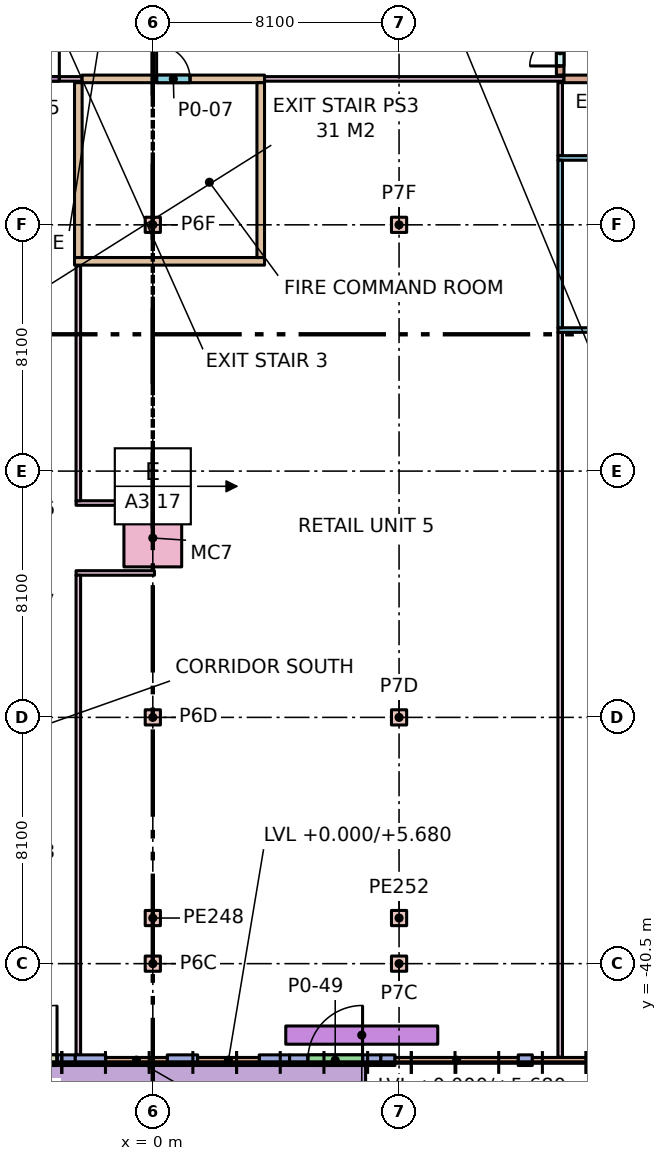
"""IFC4 building model, lengths in metres.
Left out: names, types, materials, properties, quantities, classifications, styles, units other than length and angle.
Written with IfcOpenShell. Run it as: python <this file> out.ifc"""

import sys

from ifc_helpers import new_model, si_unit, direction, frame, frame_2d, origin, origin_2d, place, context, subcontext, project, spatial, rectangle, extrude, element, fill, save


model = new_model("IFC4")
c1 = context("Model", 3, precision=1e-05, world=origin(), true_north=direction((0.0, 1.0)))
c2 = subcontext(c1, "Body", "Model", "MODEL_VIEW")
j1 = project(units=[si_unit("LENGTHUNIT", "METRE"), si_unit("PLANEANGLEUNIT", "RADIAN")], contexts=[c1])
p1 = place(None, origin())
s1 = spatial("IfcSite", under=j1, at=p1, CompositionType="ELEMENT")
p2 = place(p1, origin())
s2 = spatial("IfcBuilding", under=s1, at=p2, CompositionType="ELEMENT")
p3 = place(p2, origin())
s3 = spatial("IfcBuildingStorey", under=s2, at=p3, CompositionType="ELEMENT", Elevation=0.0)
for number, where, z_axis, x_axis in (
    (1, (0.0, -40.5, 0.0), (0.0, 0.0, 1.0), (1.0, 0.0, 0.0)),
    (2, (0.0, -32.4, 0.0), (0.0, 0.0, 1.0), (1.0, 0.0, 0.0)),
    (3, (0.0, -16.2, 0.0), (0.0, 0.0, 1.0), (1.0, 0.0, 0.0)),
    (4, (8.1, -40.5, 0.0), (0.0, 0.0, 1.0), (1.0, 0.0, 0.0)),
    (5, (8.1, -32.4, 0.0), (0.0, 0.0, 1.0), (1.0, 0.0, 0.0)),
    (6, (8.1, -16.2, 0.0), (0.0, 0.0, 1.0), (1.0, 0.0, 0.0)),
    (7, (0.0, -39.0, 0.0), (0.0, 0.0, 1.0), (1.0, 0.0, 0.0)),
    (8, (8.1, -39.0, 0.0), (0.0, 0.0, 1.0), (1.0, 0.0, 0.0)),
):
    element("IfcColumn", number, at=place(p3, frame(where, z_axis=z_axis, x_axis=x_axis)), inside=s3, PredefinedType="COLUMN", context=c2, shape_type="SweptSolid", body=[
        extrude(rectangle(XDim=0.5, YDim=0.5, at=origin_2d()), origin(), (0.0, 0.0, 1.0), 6.0),
    ])
p4 = place(p3, frame((0.0, -26.5, 0.0), z_axis=(0.0, 0.0, 1.0), x_axis=(1.0, 0.0, 0.0)))
e9 = element("IfcColumn", 9, at=p4, inside=s3, PredefinedType="COLUMN", context=c2, shape_type="SweptSolid", body=[
    extrude(rectangle(XDim=1.9, YDim=1.9, at=origin_2d()), origin(), (0.0, 0.0, 1.0), 6.0),
])
p5 = place(p3, frame((-5.55, -43.675, 0.0), z_axis=(0.0, 0.0, 1.0), x_axis=(1.0, 0.0, 0.0)))
e10 = element("IfcWall", 10, at=p5, inside=s3, PredefinedType="STANDARD", context=c2, shape_type="SweptSolid", body=[
    extrude(rectangle(XDim=3.0, YDim=0.35, at=frame_2d((1.5, 0.0))), origin(), (0.0, 0.0, 1.0), 5.68),
])
p6 = place(p5, frame((0.6, 0.0, 0.0)))
e11 = element("IfcOpeningElement", 11, at=p6, cuts=e10, PredefinedType="OPENING", context=c2, shape_type="SweptSolid", body=[
    extrude(rectangle(XDim=1.8, YDim=2.4, at=frame_2d((0.9, 1.2))), frame((0.0, 0.185, 0.0), z_axis=(0.0, -1.0, 0.0), x_axis=(1.0, 0.0, 0.0)), (0.0, 0.0, 1.0), 0.37),
])
for number, where, z_axis, x_axis in (
    (12, (-2.55, -43.675, 0.0), (0.0, 0.0, 1.0), (1.0, 0.0, 0.0)),
    (13, (0.475, -43.675, 0.0), (0.0, 0.0, 1.0), (1.0, 0.0, 0.0)),
    (14, (3.5, -43.675, 0.0), (0.0, 0.0, 1.0), (1.0, 0.0, 0.0)),
):
    element("IfcWall", number, at=place(p3, frame(where, z_axis=z_axis, x_axis=x_axis)), inside=s3, PredefinedType="STANDARD", context=c2, shape_type="SweptSolid", body=[
        extrude(rectangle(XDim=1.0, YDim=0.35, at=frame_2d((0.5, 0.0))), origin(), (0.0, 0.0, 1.0), 5.68),
    ])
p7 = place(p3, frame((4.5, -43.675, 0.0), z_axis=(0.0, 0.0, 1.0), x_axis=(1.0, 0.0, 0.0)))
e15 = element("IfcWall", 15, at=p7, inside=s3, PredefinedType="STANDARD", context=c2, shape_type="SweptSolid", body=[
    extrude(rectangle(XDim=3.0, YDim=0.35, at=frame_2d((1.5, 0.0))), origin(), (0.0, 0.0, 1.0), 5.68),
])
p8 = place(p7, frame((0.6, 0.0, 0.0)))
e16 = element("IfcOpeningElement", 16, at=p8, cuts=e15, PredefinedType="OPENING", context=c2, shape_type="SweptSolid", body=[
    extrude(rectangle(XDim=1.8, YDim=2.7, at=frame_2d((0.9, 1.35))), frame((0.0, 0.185, 0.0), z_axis=(0.0, -1.0, 0.0), x_axis=(1.0, 0.0, 0.0)), (0.0, 0.0, 1.0), 0.37),
])
for number, where, z_axis, x_axis in (
    (17, (7.5, -43.675, 0.0), (0.0, 0.0, 1.0), (1.0, 0.0, 0.0)),
    (18, (12.017, -43.675, 0.0), (0.0, 0.0, 1.0), (1.0, 0.0, 0.0)),
):
    element("IfcWall", number, at=place(p3, frame(where, z_axis=z_axis, x_axis=x_axis)), inside=s3, PredefinedType="STANDARD", context=c2, shape_type="SweptSolid", body=[
        extrude(rectangle(XDim=0.467, YDim=0.35, at=frame_2d((0.233, 0.0))), origin(), (0.0, 0.0, 1.0), 5.68),
    ])
p9 = place(p3, frame((4.373, -42.85, 6.0), z_axis=(0.0, 0.0, 1.0), x_axis=(1.0, 0.0, 0.0)))
e19 = element("IfcWall", 19, at=p9, inside=s3, PredefinedType="PARAPET", context=c2, shape_type="SweptSolid", body=[
    extrude(rectangle(XDim=5.0, YDim=0.6, at=frame_2d((2.5, 0.0))), origin(), (0.0, 0.0, 1.0), 0.9),
])
p10 = place(p3, frame((-2.325, -11.4, 0.0), z_axis=(0.0, 0.0, 1.0), x_axis=(1.0, 0.0, 0.0)))
e20 = element("IfcWall", 20, at=p10, inside=s3, PredefinedType="PARTITIONING", context=c2, shape_type="SweptSolid", body=[
    extrude(rectangle(XDim=6.0, YDim=0.25, at=frame_2d((3.0, 0.0))), origin(), (0.0, 0.0, 1.0), 5.68),
])
p11 = place(p10, frame((2.45, 0.0, 0.0)))
e21 = element("IfcOpeningElement", 21, at=p11, cuts=e20, PredefinedType="OPENING", context=c2, shape_type="SweptSolid", body=[
    extrude(rectangle(XDim=1.1, YDim=2.1, at=frame_2d((0.55, 1.05))), frame((0.0, 0.135, 0.0), z_axis=(0.0, -1.0, 0.0), x_axis=(1.0, 0.0, 0.0)), (0.0, 0.0, 1.0), 0.27),
])
p12 = place(p3, frame((-2.575, -17.4, 0.0), z_axis=(0.0, 0.0, 1.0), x_axis=(1.0, 0.0, 0.0)))
e22 = element("IfcWall", 22, at=p12, inside=s3, PredefinedType="PARTITIONING", context=c2, shape_type="SweptSolid", body=[
    extrude(rectangle(XDim=6.25, YDim=0.25, at=frame_2d((3.125, 0.0))), origin(), (0.0, 0.0, 1.0), 5.68),
])
for number, where, z_axis, x_axis in (
    (23, (3.55, -17.275, 0.0), (0.0, 0.0, 1.0), (0.0, 1.0, 0.0)),
    (24, (-2.45, -17.275, 0.0), (0.0, 0.0, 1.0), (0.0, 1.0, 0.0)),
):
    element("IfcWall", number, at=place(p3, frame(where, z_axis=z_axis, x_axis=x_axis)), inside=s3, PredefinedType="PARTITIONING", context=c2, shape_type="SweptSolid", body=[
        extrude(rectangle(XDim=5.75, YDim=0.25, at=frame_2d((2.875, 0.0))), origin(), (0.0, 0.0, 1.0), 5.68),
    ])
p13 = place(p3, frame((13.525, -11.4, 0.0), z_axis=(0.0, 0.0, 1.0), x_axis=(1.0, 0.0, 0.0)))
e25 = element("IfcWall", 25, at=p13, inside=s3, PredefinedType="STANDARD", context=c2, shape_type="SweptSolid", body=[
    extrude(rectangle(XDim=3.6, YDim=0.25, at=frame_2d((1.8, 0.0))), origin(), (0.0, 0.0, 1.0), 5.68),
])
p14 = place(p3, frame((13.325, -14.0, 0.0), z_axis=(0.0, 0.0, 1.0), x_axis=(1.0, 0.0, 0.0)))
e26 = element("IfcWall", 26, at=p14, inside=s3, PredefinedType="PARTITIONING", context=c2, shape_type="SweptSolid", body=[
    extrude(rectangle(XDim=15.8, YDim=0.15, at=frame_2d((7.9, 0.0))), origin(), (0.0, 0.0, 1.0), 5.68),
])
p15 = place(p14, frame((4.85, 0.0, 0.0)))
e27 = element("IfcOpeningElement", 27, at=p15, cuts=e26, PredefinedType="OPENING", context=c2, shape_type="SweptSolid", body=[
    extrude(rectangle(XDim=1.0, YDim=2.1, at=frame_2d((0.5, 1.05))), frame((0.0, 0.085, 0.0), z_axis=(0.0, -1.0, 0.0), x_axis=(1.0, 0.0, 0.0)), (0.0, 0.0, 1.0), 0.17),
])
p16 = place(p14, frame((14.025, 0.0, 0.0)))
e28 = element("IfcOpeningElement", 28, at=p16, cuts=e26, PredefinedType="OPENING", context=c2, shape_type="SweptSolid", body=[
    extrude(rectangle(XDim=1.0, YDim=2.1, at=frame_2d((0.5, 1.05))), frame((0.0, 0.085, 0.0), z_axis=(0.0, -1.0, 0.0), x_axis=(1.0, 0.0, 0.0)), (0.0, 0.0, 1.0), 0.17),
])
p17 = place(p3, frame((13.4, -13.925, 0.0), z_axis=(0.0, 0.0, 1.0), x_axis=(0.0, 1.0, 0.0)))
e29 = element("IfcWall", 29, at=p17, inside=s3, PredefinedType="PARTITIONING", context=c2, shape_type="SweptSolid", body=[
    extrude(rectangle(XDim=2.4, YDim=0.15, at=frame_2d((1.2, 0.0))), origin(), (0.0, 0.0, 1.0), 5.68),
])
p18 = place(p3, frame((13.4, -11.275, 0.0), z_axis=(0.0, 0.0, 1.0), x_axis=(0.0, 1.0, 0.0)))
e30 = element("IfcWall", 30, at=p18, inside=s3, PredefinedType="STANDARD", context=c2, shape_type="SweptSolid", body=[
    extrude(rectangle(XDim=9.35, YDim=0.25, at=frame_2d((4.675, 0.0))), origin(), (0.0, 0.0, 1.0), 5.68),
])
p19 = place(p18, frame((0.3, 0.0, 0.0)))
e31 = element("IfcOpeningElement", 31, at=p19, cuts=e30, PredefinedType="OPENING", context=c2, shape_type="SweptSolid", body=[
    extrude(rectangle(XDim=1.0, YDim=2.1, at=frame_2d((0.5, 1.05))), frame((0.0, 0.135, 0.0), z_axis=(0.0, -1.0, 0.0), x_axis=(1.0, 0.0, 0.0)), (0.0, 0.0, 1.0), 0.27),
])
p20 = place(p3, frame((3.675, -11.4, 0.0), z_axis=(0.0, 0.0, 1.0), x_axis=(1.0, 0.0, 0.0)))
e32 = element("IfcWall", 32, at=p20, inside=s3, PredefinedType="PARTITIONING", context=c2, shape_type="SweptSolid", body=[
    extrude(rectangle(XDim=9.85, YDim=0.15, at=frame_2d((4.925, 0.0))), origin(), (0.0, 0.0, 1.0), 5.68),
])
p21 = place(p3, frame((-5.525, -11.4, 0.0), z_axis=(0.0, 0.0, 1.0), x_axis=(1.0, 0.0, 0.0)))
e33 = element("IfcWall", 33, at=p21, inside=s3, PredefinedType="PARTITIONING", context=c2, shape_type="SweptSolid", body=[
    extrude(rectangle(XDim=3.2, YDim=0.15, at=frame_2d((1.6, 0.0))), origin(), (0.0, 0.0, 1.0), 5.68),
])
p22 = place(p21, frame((0.65, 0.0, 0.0)))
e34 = element("IfcOpeningElement", 34, at=p22, cuts=e33, PredefinedType="OPENING", context=c2, shape_type="SweptSolid", body=[
    extrude(rectangle(XDim=1.8, YDim=2.4, at=frame_2d((0.9, 1.2))), frame((0.0, 0.085, 0.0), z_axis=(0.0, -1.0, 0.0), x_axis=(1.0, 0.0, 0.0)), (0.0, 0.0, 1.0), 0.17),
])
p23 = place(p3, frame((13.325, -19.66, 0.0), z_axis=(0.0, 0.0, 1.0), x_axis=(1.0, 0.0, 0.0)))
e35 = element("IfcWall", 35, at=p23, inside=s3, PredefinedType="PARTITIONING", context=c2, shape_type="SweptSolid", body=[
    extrude(rectangle(XDim=4.368, YDim=0.15, at=frame_2d((2.184, 0.0))), origin(), (0.0, 0.0, 1.0), 5.68),
])
p24 = place(p3, frame((13.4, -19.585, 0.0), z_axis=(0.0, 0.0, 1.0), x_axis=(0.0, 1.0, 0.0)))
e36 = element("IfcWall", 36, at=p24, inside=s3, PredefinedType="PARTITIONING", context=c2, shape_type="SweptSolid", body=[
    extrude(rectangle(XDim=5.51, YDim=0.15, at=frame_2d((2.755, 0.0))), origin(), (0.0, 0.0, 1.0), 5.68),
])
p25 = place(p3, frame((13.4, -43.575, 0.0), z_axis=(0.0, 0.0, 1.0), x_axis=(0.0, 1.0, 0.0)))
e37 = element("IfcWall", 37, at=p25, inside=s3, PredefinedType="PARTITIONING", context=c2, shape_type="SweptSolid", body=[
    extrude(rectangle(XDim=23.84, YDim=0.15, at=frame_2d((11.92, 0.0))), origin(), (0.0, 0.0, 1.0), 5.68),
])
for number, where, z_axis, x_axis in (
    (38, (-2.525, -27.65, 0.0), (0.0, 0.0, 1.0), (1.0, 0.0, 0.0)),
    (39, (-2.525, -25.35, 0.0), (0.0, 0.0, 1.0), (1.0, 0.0, 0.0)),
):
    element("IfcWall", number, at=place(p3, frame(where, z_axis=z_axis, x_axis=x_axis)), inside=s3, PredefinedType="PARTITIONING", context=c2, shape_type="SweptSolid", body=[
        extrude(rectangle(XDim=2.58, YDim=0.15, at=frame_2d((1.29, 0.0))), origin(), (0.0, 0.0, 1.0), 5.68),
    ])
p26 = place(p3, frame((-2.45, -43.5, 0.0), z_axis=(0.0, 0.0, 1.0), x_axis=(0.0, 1.0, 0.0)))
e40 = element("IfcWall", 40, at=p26, inside=s3, PredefinedType="PARTITIONING", context=c2, shape_type="SweptSolid", body=[
    extrude(rectangle(XDim=15.775, YDim=0.15, at=frame_2d((7.887, 0.0))), origin(), (0.0, 0.0, 1.0), 5.68),
])
p27 = place(p3, frame((-2.45, -25.275, 0.0), z_axis=(0.0, 0.0, 1.0), x_axis=(0.0, 1.0, 0.0)))
e41 = element("IfcWall", 41, at=p27, inside=s3, PredefinedType="PARTITIONING", context=c2, shape_type="SweptSolid", body=[
    extrude(rectangle(XDim=7.75, YDim=0.15, at=frame_2d((3.875, 0.0))), origin(), (0.0, 0.0, 1.0), 5.68),
])
p28 = place(p19, origin())
e42 = element("IfcDoor", 42, at=p28, inside=s3, OperationType="SINGLE_SWING_LEFT", PredefinedType="DOOR", context=c2, shape_type="SweptSolid", body=[
    extrude(rectangle(XDim=1.0, YDim=2.1, at=frame_2d((0.5, 1.05))), frame((0.0, 0.025, 0.0), z_axis=(0.0, -1.0, 0.0), x_axis=(1.0, 0.0, 0.0)), (0.0, 0.0, 1.0), 0.05),
])
fill(e31, e42)
p29 = place(p11, origin())
e43 = element("IfcDoor", 43, at=p29, inside=s3, OperationType="SINGLE_SWING_LEFT", PredefinedType="DOOR", context=c2, shape_type="SweptSolid", body=[
    extrude(rectangle(XDim=1.1, YDim=2.1, at=frame_2d((0.55, 1.05))), frame((0.0, 0.025, 0.0), z_axis=(0.0, -1.0, 0.0), x_axis=(1.0, 0.0, 0.0)), (0.0, 0.0, 1.0), 0.05),
])
fill(e21, e43)
p30 = place(p6, frame((1.8, 0.0, 0.0), z_axis=(0.0, 0.0, 1.0), x_axis=(-1.0, 0.0, 0.0)))
e44 = element("IfcDoor", 44, at=p30, inside=s3, OperationType="SINGLE_SWING_RIGHT", PredefinedType="DOOR", context=c2, shape_type="SweptSolid", body=[
    extrude(rectangle(XDim=1.8, YDim=2.4, at=frame_2d((0.9, 1.2))), frame((0.0, 0.025, 0.0), z_axis=(0.0, -1.0, 0.0), x_axis=(1.0, 0.0, 0.0)), (0.0, 0.0, 1.0), 0.05),
])
fill(e11, e44)
p31 = place(p8, frame((1.8, 0.0, 0.0), z_axis=(0.0, 0.0, 1.0), x_axis=(-1.0, 0.0, 0.0)))
e45 = element("IfcDoor", 45, at=p31, inside=s3, OperationType="SINGLE_SWING_RIGHT", PredefinedType="DOOR", context=c2, shape_type="SweptSolid", body=[
    extrude(rectangle(XDim=1.8, YDim=2.7, at=frame_2d((0.9, 1.35))), frame((0.0, 0.025, 0.0), z_axis=(0.0, -1.0, 0.0), x_axis=(1.0, 0.0, 0.0)), (0.0, 0.0, 1.0), 0.05),
])
fill(e16, e45)
p32 = place(p22, frame((1.8, 0.0, 0.0), z_axis=(0.0, 0.0, 1.0), x_axis=(-1.0, 0.0, 0.0)))
e46 = element("IfcDoor", 46, at=p32, inside=s3, OperationType="SINGLE_SWING_RIGHT", PredefinedType="DOOR", context=c2, shape_type="SweptSolid", body=[
    extrude(rectangle(XDim=1.8, YDim=2.4, at=frame_2d((0.9, 1.2))), frame((0.0, 0.025, 0.0), z_axis=(0.0, -1.0, 0.0), x_axis=(1.0, 0.0, 0.0)), (0.0, 0.0, 1.0), 0.05),
])
fill(e34, e46)
save(model, sys.argv[1])
